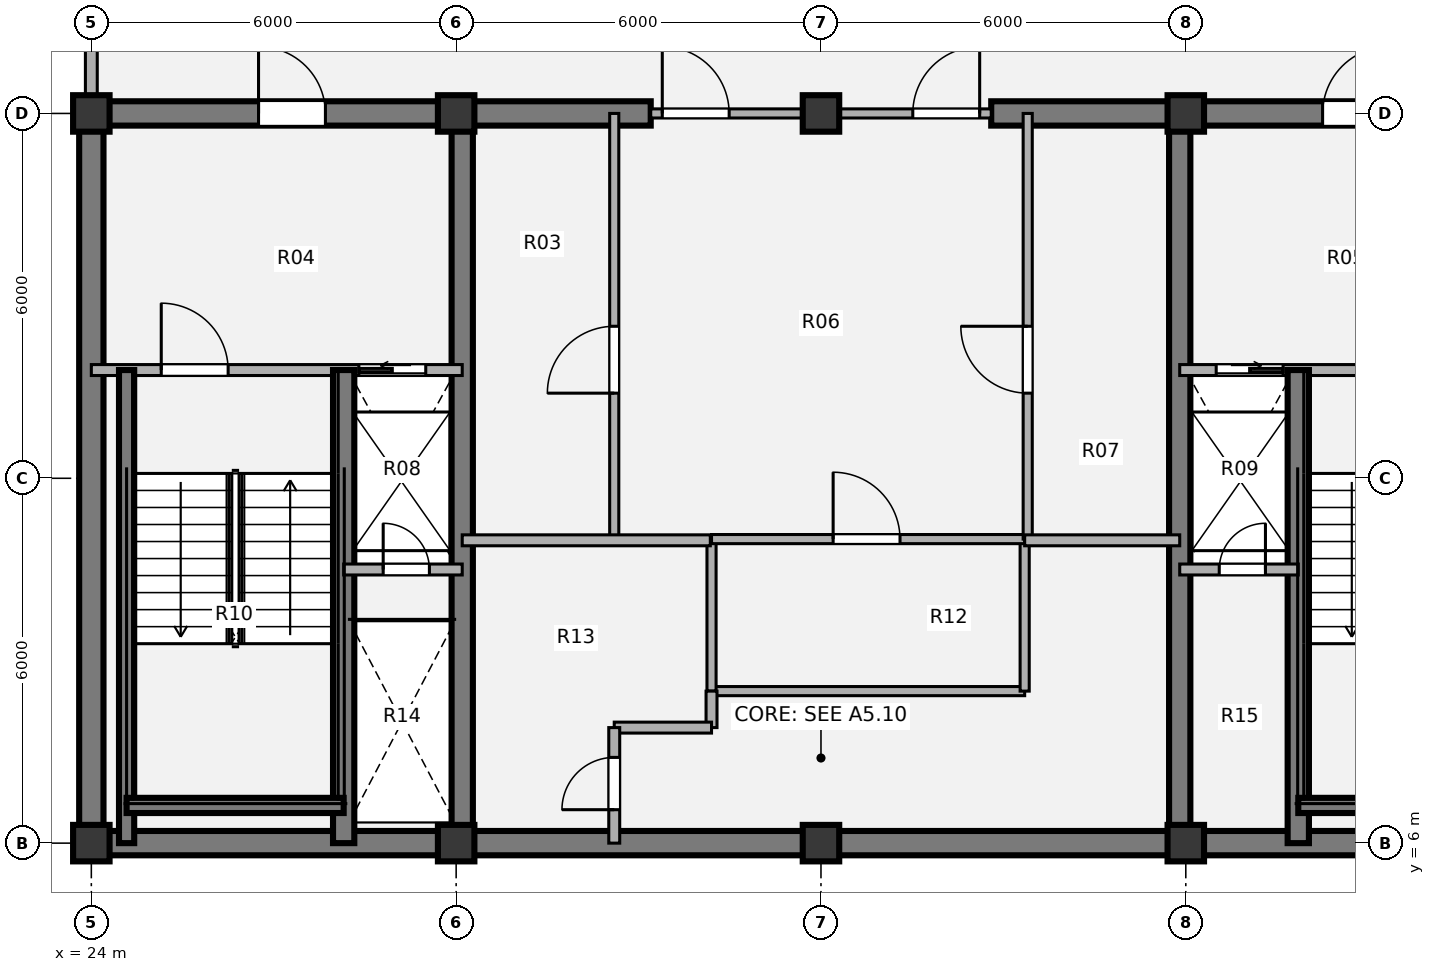
"""IFC4 building model, lengths in metres.
Left out: names, types, materials, properties, quantities, classifications, styles, units other than length and angle.
Written with IfcOpenShell. Run it as: python <this file> out.ifc"""

import sys

from ifc_helpers import new_model, si_unit, direction, frame, frame_2d, origin, origin_2d, place, context, subcontext, project, spatial, rectangle, extrude, source, transform, mapped, element, fill, save


model = new_model("IFC4")
c1 = context("Model", 3, precision=1e-05, world=origin(), true_north=direction((0.0, 1.0)))
c2 = subcontext(c1, "Body", "Model", "MODEL_VIEW")
j1 = project(units=[si_unit("LENGTHUNIT", "METRE"), si_unit("PLANEANGLEUNIT", "RADIAN")], contexts=[c1])
p1 = place(None, origin())
s1 = spatial("IfcSite", under=j1, at=p1, CompositionType="ELEMENT")
p2 = place(p1, origin())
s2 = spatial("IfcBuilding", under=s1, at=p2, CompositionType="ELEMENT")
p3 = place(p2, frame((0.0, 0.0, 295.92)))
s3 = spatial("IfcBuildingStorey", under=s2, at=p3, CompositionType="ELEMENT", Elevation=295.92)
m1 = source(origin(), c2, "Body", "SweptSolid", [
    extrude(rectangle(XDim=0.6, YDim=0.6, at=origin_2d()), origin(), (0.0, 0.0, 1.0), 3.96),
])
for number, where, z_axis, x_axis in (
    (1, (24.0, 6.0, 0.0), (0.0, 0.0, 1.0), (1.0, 0.0, 0.0)),
    (2, (30.0, 6.0, 0.0), (0.0, 0.0, 1.0), (1.0, 0.0, 0.0)),
    (3, (36.0, 6.0, 0.0), (0.0, 0.0, 1.0), (1.0, 0.0, 0.0)),
    (4, (42.0, 6.0, 0.0), (0.0, 0.0, 1.0), (1.0, 0.0, 0.0)),
    (5, (24.0, 18.0, 0.0), (0.0, 0.0, 1.0), (1.0, 0.0, 0.0)),
    (6, (30.0, 18.0, 0.0), (0.0, 0.0, 1.0), (1.0, 0.0, 0.0)),
    (7, (36.0, 18.0, 0.0), (0.0, 0.0, 1.0), (1.0, 0.0, 0.0)),
    (8, (42.0, 18.0, 0.0), (0.0, 0.0, 1.0), (1.0, 0.0, 0.0)),
):
    element("IfcColumn", number, at=place(p3, frame(where, z_axis=z_axis, x_axis=x_axis)), inside=s3, PredefinedType="COLUMN", context=c2, shape_type="MappedRepresentation", body=[
        mapped(m1, transform((0.0, 0.0, 0.0), x_axis=(1.0, 0.0, 0.0), y_axis=(0.0, 1.0, 0.0), z_axis=(0.0, 0.0, 1.0), scale=1.0)),
    ])
p4 = place(p3, frame((48.2, 6.0, 0.0), z_axis=(0.0, 0.0, 1.0), x_axis=(-1.0, 0.0, 0.0)))
e9 = element("IfcWall", 9, at=p4, inside=s3, PredefinedType="SHEAR", context=c2, shape_type="SweptSolid", body=[
    extrude(rectangle(XDim=24.4, YDim=0.4, at=frame_2d((12.2, 0.0))), origin(), (0.0, 0.0, 1.0), 3.96),
])
p5 = place(p3, frame((24.0, 6.0, 0.0), z_axis=(0.0, 0.0, 1.0), x_axis=(0.0, 1.0, 0.0)))
e10 = element("IfcWall", 10, at=p5, inside=s3, PredefinedType="SHEAR", context=c2, shape_type="SweptSolid", body=[
    extrude(rectangle(XDim=12.0, YDim=0.4, at=frame_2d((6.0, 0.0))), origin(), (0.0, 0.0, 1.0), 3.96),
])
p6 = place(p3, frame((23.8, 18.0, 0.0), z_axis=(0.0, 0.0, 1.0), x_axis=(1.0, 0.0, 0.0)))
e11 = element("IfcWall", 11, at=p6, inside=s3, PredefinedType="SHEAR", context=c2, shape_type="SweptSolid", body=[
    extrude(rectangle(XDim=9.4, YDim=0.4, at=frame_2d((4.7, 0.0))), origin(), (0.0, 0.0, 1.0), 3.96),
])
p7 = place(p6, frame((2.95, 0.0, 0.0)))
e12 = element("IfcOpeningElement", 12, at=p7, cuts=e11, PredefinedType="OPENING", context=c2, shape_type="SweptSolid", body=[
    extrude(rectangle(XDim=1.1, YDim=2.1, at=origin_2d()), frame((0.55, 0.21, 1.05), z_axis=(0.0, -1.0, 0.0), x_axis=(1.0, 0.0, 0.0)), (0.0, 0.0, 1.0), 0.42),
])
p8 = place(p3, frame((38.8, 18.0, 0.0), z_axis=(0.0, 0.0, 1.0), x_axis=(1.0, 0.0, 0.0)))
e13 = element("IfcWall", 13, at=p8, inside=s3, PredefinedType="SHEAR", context=c2, shape_type="SweptSolid", body=[
    extrude(rectangle(XDim=9.4, YDim=0.4, at=frame_2d((4.7, 0.0))), origin(), (0.0, 0.0, 1.0), 3.96),
])
p9 = place(p8, frame((5.45, 0.0, 0.0)))
e14 = element("IfcOpeningElement", 14, at=p9, cuts=e13, PredefinedType="OPENING", context=c2, shape_type="SweptSolid", body=[
    extrude(rectangle(XDim=1.1, YDim=2.1, at=origin_2d()), frame((0.55, 0.21, 1.05), z_axis=(0.0, -1.0, 0.0), x_axis=(1.0, 0.0, 0.0)), (0.0, 0.0, 1.0), 0.42),
])
for number, where, z_axis, x_axis in (
    (15, (30.1, 6.0, 0.0), (0.0, 0.0, 1.0), (0.0, 1.0, 0.0)),
    (16, (41.9, 18.0, 0.0), (0.0, 0.0, 1.0), (0.0, -1.0, 0.0)),
):
    element("IfcWall", number, at=place(p3, frame(where, z_axis=z_axis, x_axis=x_axis)), inside=s3, PredefinedType="SHEAR", context=c2, shape_type="SweptSolid", body=[
        extrude(rectangle(XDim=12.0, YDim=0.35, at=frame_2d((6.0, 0.0))), origin(), (0.0, 0.0, 1.0), 3.96),
    ])
p10 = place(p3, frame((24.0, 18.28, 0.0), z_axis=(0.0, 0.0, 1.0), x_axis=(0.0, 1.0, 0.0)))
e17 = element("IfcWall", 17, at=p10, inside=s3, PredefinedType="SOLIDWALL", context=c2, shape_type="SweptSolid", body=[
    extrude(rectangle(XDim=2.77, YDim=0.195, at=frame_2d((1.385, 0.0))), origin(), (0.0, 0.0, 1.0), 2.898),
])
p11 = place(p3, frame((32.6, 11.0, 0.0), z_axis=(0.0, 0.0, 1.0), x_axis=(0.0, 1.0, 0.0)))
e18 = element("IfcWall", 18, at=p11, inside=s3, PredefinedType="PARTITIONING", context=c2, shape_type="SweptSolid", body=[
    extrude(rectangle(XDim=7.0, YDim=0.15, at=frame_2d((3.5, 0.0))), origin(), (0.0, 0.0, 1.0), 3.68),
])
p12 = place(p11, frame((2.4, 0.0, 0.0)))
e19 = element("IfcOpeningElement", 19, at=p12, cuts=e18, PredefinedType="OPENING", context=c2, shape_type="SweptSolid", body=[
    extrude(rectangle(XDim=1.1, YDim=2.1, at=origin_2d()), frame((0.55, 0.085, 1.05), z_axis=(0.0, -1.0, 0.0), x_axis=(1.0, 0.0, 0.0)), (0.0, 0.0, 1.0), 0.17),
])
p13 = place(p3, frame((34.2, 8.5, 0.0), z_axis=(0.0, 0.0, 1.0), x_axis=(1.0, 0.0, 0.0)))
e20 = element("IfcWall", 20, at=p13, inside=s3, PredefinedType="PARTITIONING", context=c2, shape_type="SweptSolid", body=[
    extrude(rectangle(XDim=5.15, YDim=0.15, at=frame_2d((2.575, 0.0))), origin(), (0.0, 0.0, 1.0), 3.68),
])
for number, where, z_axis, x_axis in (
    (21, (34.2, 8.5, 0.0), (0.0, 0.0, 1.0), (0.0, 1.0, 0.0)),
    (22, (39.35, 8.5, 0.0), (0.0, 0.0, 1.0), (0.0, 1.0, 0.0)),
):
    element("IfcWall", number, at=place(p3, frame(where, z_axis=z_axis, x_axis=x_axis)), inside=s3, PredefinedType="PARTITIONING", context=c2, shape_type="SweptSolid", body=[
        extrude(rectangle(XDim=2.5, YDim=0.15, at=frame_2d((1.25, 0.0))), origin(), (0.0, 0.0, 1.0), 3.68),
    ])
p14 = place(p3, frame((34.2, 11.0, 0.0), z_axis=(0.0, 0.0, 1.0), x_axis=(1.0, 0.0, 0.0)))
e23 = element("IfcWall", 23, at=p14, inside=s3, PredefinedType="PARTITIONING", context=c2, shape_type="SweptSolid", body=[
    extrude(rectangle(XDim=5.15, YDim=0.15, at=frame_2d((2.575, 0.0))), origin(), (0.0, 0.0, 1.0), 3.68),
])
p15 = place(p14, frame((2.0, 0.0, 0.0)))
e24 = element("IfcOpeningElement", 24, at=p15, cuts=e23, PredefinedType="OPENING", context=c2, shape_type="SweptSolid", body=[
    extrude(rectangle(XDim=1.1, YDim=2.1, at=origin_2d()), frame((0.55, 0.085, 1.05), z_axis=(0.0, -1.0, 0.0), x_axis=(1.0, 0.0, 0.0)), (0.0, 0.0, 1.0), 0.17),
])
p16 = place(p3, frame((39.4, 11.0, 0.0), z_axis=(0.0, 0.0, 1.0), x_axis=(0.0, 1.0, 0.0)))
e25 = element("IfcWall", 25, at=p16, inside=s3, PredefinedType="PARTITIONING", context=c2, shape_type="SweptSolid", body=[
    extrude(rectangle(XDim=7.0, YDim=0.15, at=frame_2d((3.5, 0.0))), origin(), (0.0, 0.0, 1.0), 3.68),
])
p17 = place(p16, frame((2.4, 0.0, 0.0)))
e26 = element("IfcOpeningElement", 26, at=p17, cuts=e25, PredefinedType="OPENING", context=c2, shape_type="SweptSolid", body=[
    extrude(rectangle(XDim=1.1, YDim=2.1, at=origin_2d()), frame((0.55, 0.085, 1.05), z_axis=(0.0, -1.0, 0.0), x_axis=(1.0, 0.0, 0.0)), (0.0, 0.0, 1.0), 0.17),
])
p18 = place(p3, frame((30.1, 10.98, 0.0), z_axis=(0.0, 0.0, 1.0), x_axis=(1.0, 0.0, 0.0)))
e27 = element("IfcWall", 27, at=p18, inside=s3, PredefinedType="PARTITIONING", context=c2, shape_type="SweptSolid", body=[
    extrude(rectangle(XDim=4.08, YDim=0.18, at=frame_2d((2.04, 0.0))), origin(), (0.0, 0.0, 1.0), 3.68),
])
p19 = place(p3, frame((34.2, 7.9, 0.0), z_axis=(0.0, 0.0, 1.0), x_axis=(0.0, 1.0, 0.0)))
e28 = element("IfcWall", 28, at=p19, inside=s3, PredefinedType="PARTITIONING", context=c2, shape_type="SweptSolid", body=[
    extrude(rectangle(XDim=0.6, YDim=0.18, at=frame_2d((0.3, 0.0))), origin(), (0.0, 0.0, 1.0), 3.68),
])
p20 = place(p3, frame((32.6, 7.9, 0.0), z_axis=(0.0, 0.0, 1.0), x_axis=(1.0, 0.0, 0.0)))
e29 = element("IfcWall", 29, at=p20, inside=s3, PredefinedType="PARTITIONING", context=c2, shape_type="SweptSolid", body=[
    extrude(rectangle(XDim=1.6, YDim=0.18, at=frame_2d((0.8, 0.0))), origin(), (0.0, 0.0, 1.0), 3.68),
])
p21 = place(p3, frame((32.6, 6.0, 0.0), z_axis=(0.0, 0.0, 1.0), x_axis=(0.0, 1.0, 0.0)))
e30 = element("IfcWall", 30, at=p21, inside=s3, PredefinedType="PARTITIONING", context=c2, shape_type="SweptSolid", body=[
    extrude(rectangle(XDim=1.9, YDim=0.18, at=frame_2d((0.95, 0.0))), origin(), (0.0, 0.0, 1.0), 3.68),
])
p22 = place(p21, frame((0.55, 0.0, 0.0)))
e31 = element("IfcOpeningElement", 31, at=p22, cuts=e30, PredefinedType="OPENING", context=c2, shape_type="SweptSolid", body=[
    extrude(rectangle(XDim=0.86, YDim=2.1, at=origin_2d()), frame((0.43, 0.1, 1.05), z_axis=(0.0, -1.0, 0.0), x_axis=(1.0, 0.0, 0.0)), (0.0, 0.0, 1.0), 0.2),
])
p23 = place(p3, frame((39.35, 10.98, 0.0), z_axis=(0.0, 0.0, 1.0), x_axis=(1.0, 0.0, 0.0)))
e32 = element("IfcWall", 32, at=p23, inside=s3, PredefinedType="PARTITIONING", context=c2, shape_type="SweptSolid", body=[
    extrude(rectangle(XDim=2.55, YDim=0.18, at=frame_2d((1.275, 0.0))), origin(), (0.0, 0.0, 1.0), 3.68),
])
p24 = place(p3, frame((33.2, 18.0, 0.0), z_axis=(0.0, 0.0, 1.0), x_axis=(1.0, 0.0, 0.0)))
e33 = element("IfcWall", 33, at=p24, inside=s3, PredefinedType="PARTITIONING", context=c2, shape_type="SweptSolid", body=[
    extrude(rectangle(XDim=5.6, YDim=0.15, at=frame_2d((2.8, 0.0))), origin(), (0.0, 0.0, 1.0), 2.695),
])
p25 = place(p24, frame((0.19, 0.0, 0.0)))
e34 = element("IfcOpeningElement", 34, at=p25, cuts=e33, PredefinedType="OPENING", context=c2, shape_type="SweptSolid", body=[
    extrude(rectangle(XDim=1.1, YDim=2.1, at=origin_2d()), frame((0.55, 0.085, 1.05), z_axis=(0.0, -1.0, 0.0), x_axis=(1.0, 0.0, 0.0)), (0.0, 0.0, 1.0), 0.17),
])
p26 = place(p24, frame((4.31, 0.0, 0.0)))
e35 = element("IfcOpeningElement", 35, at=p26, cuts=e33, PredefinedType="OPENING", context=c2, shape_type="SweptSolid", body=[
    extrude(rectangle(XDim=1.1, YDim=2.1, at=origin_2d()), frame((0.55, 0.085, 1.05), z_axis=(0.0, -1.0, 0.0), x_axis=(1.0, 0.0, 0.0)), (0.0, 0.0, 1.0), 0.17),
])
p27 = place(p3, frame((24.0, 13.78, 0.0), z_axis=(0.0, 0.0, 1.0), x_axis=(1.0, 0.0, 0.0)))
e36 = element("IfcWall", 36, at=p27, inside=s3, PredefinedType="PARTITIONING", context=c2, shape_type="SweptSolid", body=[
    extrude(rectangle(XDim=6.1, YDim=0.18, at=frame_2d((3.05, 0.0))), origin(), (0.0, 0.0, 1.0), 3.68),
])
p28 = place(p27, frame((1.15, 0.0, 0.0)))
e37 = element("IfcOpeningElement", 37, at=p28, cuts=e36, PredefinedType="OPENING", context=c2, shape_type="SweptSolid", body=[
    extrude(rectangle(XDim=1.1, YDim=2.1, at=origin_2d()), frame((0.55, 0.1, 1.05), z_axis=(0.0, -1.0, 0.0), x_axis=(1.0, 0.0, 0.0)), (0.0, 0.0, 1.0), 0.2),
])
p29 = place(p27, frame((4.4, 0.0, 0.0)))
e38 = element("IfcOpeningElement", 38, at=p29, cuts=e36, PredefinedType="OPENING", context=c2, shape_type="SweptSolid", body=[
    extrude(rectangle(XDim=1.1, YDim=2.1, at=origin_2d()), frame((0.55, 0.1, 1.05), z_axis=(0.0, -1.0, 0.0), x_axis=(1.0, 0.0, 0.0)), (0.0, 0.0, 1.0), 0.2),
])
p30 = place(p3, frame((28.15, 6.0, 0.0), z_axis=(0.0, 0.0, 1.0), x_axis=(0.0, 1.0, 0.0)))
e39 = element("IfcWall", 39, at=p30, inside=s3, PredefinedType="SHEAR", context=c2, shape_type="SweptSolid", body=[
    extrude(rectangle(XDim=7.78, YDim=0.35, at=frame_2d((3.89, 0.0))), origin(), (0.0, 0.0, 1.0), 4.03),
])
p31 = place(p3, frame((24.58, 6.0, 0.0), z_axis=(0.0, 0.0, 1.0), x_axis=(0.0, 1.0, 0.0)))
e40 = element("IfcWall", 40, at=p31, inside=s3, PredefinedType="SHEAR", context=c2, shape_type="SweptSolid", body=[
    extrude(rectangle(XDim=7.78, YDim=0.25, at=frame_2d((3.89, 0.0))), origin(), (0.0, 0.0, 1.0), 4.03),
])
p32 = place(p3, frame((24.58, 6.62, 0.0), z_axis=(0.0, 0.0, 1.0), x_axis=(1.0, 0.0, 0.0)))
e41 = element("IfcWall", 41, at=p32, inside=s3, PredefinedType="SHEAR", context=c2, shape_type="SweptSolid", body=[
    extrude(rectangle(XDim=3.57, YDim=0.25, at=frame_2d((1.785, 0.0))), origin(), (0.0, 0.0, 1.0), 4.03),
])
p33 = place(p3, frame((28.15, 10.5, 0.0), z_axis=(0.0, 0.0, 1.0), x_axis=(1.0, 0.0, 0.0)))
e42 = element("IfcWall", 42, at=p33, inside=s3, PredefinedType="PARTITIONING", context=c2, shape_type="SweptSolid", body=[
    extrude(rectangle(XDim=1.95, YDim=0.18, at=frame_2d((0.975, 0.0))), origin(), (0.0, 0.0, 1.0), 3.68),
])
p34 = place(p33, frame((0.65, 0.0, 0.0)))
e43 = element("IfcOpeningElement", 43, at=p34, cuts=e42, PredefinedType="OPENING", context=c2, shape_type="SweptSolid", body=[
    extrude(rectangle(XDim=0.76, YDim=2.05, at=origin_2d()), frame((0.38, 0.1, 1.025), z_axis=(0.0, -1.0, 0.0), x_axis=(1.0, 0.0, 0.0)), (0.0, 0.0, 1.0), 0.2),
])
p35 = place(p3, frame((41.9, 13.78, 0.0), z_axis=(0.0, 0.0, 1.0), x_axis=(1.0, 0.0, 0.0)))
e44 = element("IfcWall", 44, at=p35, inside=s3, PredefinedType="PARTITIONING", context=c2, shape_type="SweptSolid", body=[
    extrude(rectangle(XDim=6.1, YDim=0.18, at=frame_2d((3.05, 0.0))), origin(), (0.0, 0.0, 1.0), 3.68),
])
p36 = place(p35, frame((0.6, 0.0, 0.0)))
e45 = element("IfcOpeningElement", 45, at=p36, cuts=e44, PredefinedType="OPENING", context=c2, shape_type="SweptSolid", body=[
    extrude(rectangle(XDim=1.1, YDim=2.1, at=origin_2d()), frame((0.55, 0.1, 1.05), z_axis=(0.0, -1.0, 0.0), x_axis=(1.0, 0.0, 0.0)), (0.0, 0.0, 1.0), 0.2),
])
p37 = place(p35, frame((3.8, 0.0, 0.0)))
e46 = element("IfcOpeningElement", 46, at=p37, cuts=e44, PredefinedType="OPENING", context=c2, shape_type="SweptSolid", body=[
    extrude(rectangle(XDim=1.1, YDim=2.1, at=origin_2d()), frame((0.55, 0.1, 1.05), z_axis=(0.0, -1.0, 0.0), x_axis=(1.0, 0.0, 0.0)), (0.0, 0.0, 1.0), 0.2),
])
p38 = place(p3, frame((43.85, 6.0, 0.0), z_axis=(0.0, 0.0, 1.0), x_axis=(0.0, 1.0, 0.0)))
e47 = element("IfcWall", 47, at=p38, inside=s3, PredefinedType="SHEAR", context=c2, shape_type="SweptSolid", body=[
    extrude(rectangle(XDim=7.78, YDim=0.35, at=frame_2d((3.89, 0.0))), origin(), (0.0, 0.0, 1.0), 4.03),
])
p39 = place(p3, frame((43.85, 6.62, 0.0), z_axis=(0.0, 0.0, 1.0), x_axis=(1.0, 0.0, 0.0)))
e48 = element("IfcWall", 48, at=p39, inside=s3, PredefinedType="SHEAR", context=c2, shape_type="SweptSolid", body=[
    extrude(rectangle(XDim=3.57, YDim=0.25, at=frame_2d((1.785, 0.0))), origin(), (0.0, 0.0, 1.0), 4.03),
])
p40 = place(p3, frame((41.9, 10.5, 0.0), z_axis=(0.0, 0.0, 1.0), x_axis=(1.0, 0.0, 0.0)))
e49 = element("IfcWall", 49, at=p40, inside=s3, PredefinedType="PARTITIONING", context=c2, shape_type="SweptSolid", body=[
    extrude(rectangle(XDim=1.95, YDim=0.18, at=frame_2d((0.975, 0.0))), origin(), (0.0, 0.0, 1.0), 3.68),
])
p41 = place(p40, frame((0.65, 0.0, 0.0)))
e50 = element("IfcOpeningElement", 50, at=p41, cuts=e49, PredefinedType="OPENING", context=c2, shape_type="SweptSolid", body=[
    extrude(rectangle(XDim=0.76, YDim=2.05, at=origin_2d()), frame((0.38, 0.1, 1.025), z_axis=(0.0, -1.0, 0.0), x_axis=(1.0, 0.0, 0.0)), (0.0, 0.0, 1.0), 0.2),
])
m2 = source(origin(), c2, "Body", "SweptSolid", [
    extrude(rectangle(XDim=1.1, YDim=2.1, at=origin_2d()), frame((0.55, 0.025, 1.05), z_axis=(0.0, -1.0, 0.0), x_axis=(1.0, 0.0, 0.0)), (0.0, 0.0, 1.0), 0.05),
])
p42 = place(p12, origin())
e51 = element("IfcDoor", 51, at=p42, inside=s3, OperationType="SINGLE_SWING_LEFT", PredefinedType="DOOR", context=c2, shape_type="MappedRepresentation", body=[
    mapped(m2, transform((0.0, 0.0, 0.0), x_axis=(1.0, 0.0, 0.0), y_axis=(0.0, 1.0, 0.0), z_axis=(0.0, 0.0, 1.0), scale=1.0)),
])
fill(e19, e51)
p43 = place(p15, origin())
e52 = element("IfcDoor", 52, at=p43, inside=s3, OperationType="SINGLE_SWING_LEFT", PredefinedType="DOOR", context=c2, shape_type="MappedRepresentation", body=[
    mapped(m2, transform((0.0, 0.0, 0.0), x_axis=(1.0, 0.0, 0.0), y_axis=(0.0, 1.0, 0.0), z_axis=(0.0, 0.0, 1.0), scale=1.0)),
])
fill(e24, e52)
p44 = place(p17, origin())
e53 = element("IfcDoor", 53, at=p44, inside=s3, OperationType="SINGLE_SWING_RIGHT", PredefinedType="DOOR", context=c2, shape_type="MappedRepresentation", body=[
    mapped(m2, transform((0.0, 0.0, 0.0), x_axis=(1.0, 0.0, 0.0), y_axis=(0.0, 1.0, 0.0), z_axis=(0.0, 0.0, 1.0), scale=1.0)),
])
fill(e26, e53)
m3 = source(origin(), c2, "Body", "SweptSolid", [
    extrude(rectangle(XDim=0.86, YDim=2.1, at=origin_2d()), frame((0.43, 0.025, 1.05), z_axis=(0.0, -1.0, 0.0), x_axis=(1.0, 0.0, 0.0)), (0.0, 0.0, 1.0), 0.05),
])
p45 = place(p22, origin())
e54 = element("IfcDoor", 54, at=p45, inside=s3, OperationType="SINGLE_SWING_LEFT", PredefinedType="DOOR", context=c2, shape_type="MappedRepresentation", body=[
    mapped(m3, transform((0.0, 0.0, 0.0), x_axis=(1.0, 0.0, 0.0), y_axis=(0.0, 1.0, 0.0), z_axis=(0.0, 0.0, 1.0), scale=1.0)),
])
fill(e31, e54)
m4 = source(origin(), c2, "Body", "SweptSolid", [
    extrude(rectangle(XDim=1.1, YDim=2.1, at=origin_2d()), frame((0.55, 0.025, 1.05), z_axis=(0.0, -1.0, 0.0), x_axis=(1.0, 0.0, 0.0)), (0.0, 0.0, 1.0), 0.05),
])
p46 = place(p25, origin())
e55 = element("IfcDoor", 55, at=p46, inside=s3, OperationType="SINGLE_SWING_LEFT", PredefinedType="DOOR", context=c2, shape_type="MappedRepresentation", body=[
    mapped(m4, transform((0.0, 0.0, 0.0), x_axis=(1.0, 0.0, 0.0), y_axis=(0.0, 1.0, 0.0), z_axis=(0.0, 0.0, 1.0), scale=1.0)),
])
fill(e34, e55)
p47 = place(p26, origin())
e56 = element("IfcDoor", 56, at=p47, inside=s3, OperationType="SINGLE_SWING_RIGHT", PredefinedType="DOOR", context=c2, shape_type="MappedRepresentation", body=[
    mapped(m4, transform((0.0, 0.0, 0.0), x_axis=(1.0, 0.0, 0.0), y_axis=(0.0, 1.0, 0.0), z_axis=(0.0, 0.0, 1.0), scale=1.0)),
])
fill(e35, e56)
m5 = source(origin(), c2, "Body", "SweptSolid", [
    extrude(rectangle(XDim=1.1, YDim=2.1, at=origin_2d()), frame((0.55, 0.025, 1.05), z_axis=(0.0, -1.0, 0.0), x_axis=(1.0, 0.0, 0.0)), (0.0, 0.0, 1.0), 0.05),
])
p48 = place(p28, origin())
e57 = element("IfcDoor", 57, at=p48, inside=s3, OperationType="SINGLE_SWING_LEFT", PredefinedType="DOOR", context=c2, shape_type="MappedRepresentation", body=[
    mapped(m5, transform((0.0, 0.0, 0.0), x_axis=(1.0, 0.0, 0.0), y_axis=(0.0, 1.0, 0.0), z_axis=(0.0, 0.0, 1.0), scale=1.0)),
])
fill(e37, e57)
m6 = source(origin(), c2, "Body", "SweptSolid", [
    extrude(rectangle(XDim=1.1, YDim=2.1, at=origin_2d()), frame((0.55, 0.025, 1.05), z_axis=(0.0, -1.0, 0.0), x_axis=(1.0, 0.0, 0.0)), (0.0, 0.0, 1.0), 0.05),
])
p49 = place(p29, origin())
e58 = element("IfcDoor", 58, at=p49, inside=s3, OperationType="SLIDING_TO_LEFT", PredefinedType="DOOR", context=c2, shape_type="MappedRepresentation", body=[
    mapped(m6, transform((0.0, 0.0, 0.0), x_axis=(1.0, 0.0, 0.0), y_axis=(0.0, 1.0, 0.0), z_axis=(0.0, 0.0, 1.0), scale=1.0)),
])
fill(e38, e58)
m7 = source(origin(), c2, "Body", "SweptSolid", [
    extrude(rectangle(XDim=0.76, YDim=2.05, at=origin_2d()), frame((0.38, 0.025, 1.025), z_axis=(0.0, -1.0, 0.0), x_axis=(1.0, 0.0, 0.0)), (0.0, 0.0, 1.0), 0.05),
])
p50 = place(p34, origin())
e59 = element("IfcDoor", 59, at=p50, inside=s3, OperationType="SINGLE_SWING_LEFT", PredefinedType="DOOR", context=c2, shape_type="MappedRepresentation", body=[
    mapped(m7, transform((0.0, 0.0, 0.0), x_axis=(1.0, 0.0, 0.0), y_axis=(0.0, 1.0, 0.0), z_axis=(0.0, 0.0, 1.0), scale=1.0)),
])
fill(e43, e59)
p51 = place(p36, origin())
e60 = element("IfcDoor", 60, at=p51, inside=s3, OperationType="SLIDING_TO_RIGHT", PredefinedType="DOOR", context=c2, shape_type="MappedRepresentation", body=[
    mapped(m6, transform((0.0, 0.0, 0.0), x_axis=(1.0, 0.0, 0.0), y_axis=(0.0, 1.0, 0.0), z_axis=(0.0, 0.0, 1.0), scale=1.0)),
])
fill(e45, e60)
p52 = place(p41, origin())
e61 = element("IfcDoor", 61, at=p52, inside=s3, OperationType="SINGLE_SWING_RIGHT", PredefinedType="DOOR", context=c2, shape_type="MappedRepresentation", body=[
    mapped(m7, transform((0.0, 0.0, 0.0), x_axis=(1.0, 0.0, 0.0), y_axis=(0.0, 1.0, 0.0), z_axis=(0.0, 0.0, 1.0), scale=1.0)),
])
fill(e50, e61)
p53 = place(p7, origin())
e62 = element("IfcDoor", 62, at=p53, inside=s3, OperationType="SINGLE_SWING_LEFT", PredefinedType="DOOR", context=c2, shape_type="MappedRepresentation", body=[
    mapped(m4, transform((0.0, 0.0, 0.0), x_axis=(1.0, 0.0, 0.0), y_axis=(0.0, 1.0, 0.0), z_axis=(0.0, 0.0, 1.0), scale=1.0)),
])
fill(e12, e62)
p54 = place(p9, origin())
e63 = element("IfcDoor", 63, at=p54, inside=s3, OperationType="SINGLE_SWING_RIGHT", PredefinedType="DOOR", context=c2, shape_type="MappedRepresentation", body=[
    mapped(m4, transform((0.0, 0.0, 0.0), x_axis=(1.0, 0.0, 0.0), y_axis=(0.0, 1.0, 0.0), z_axis=(0.0, 0.0, 1.0), scale=1.0)),
])
fill(e14, e63)
save(model, sys.argv[1])
